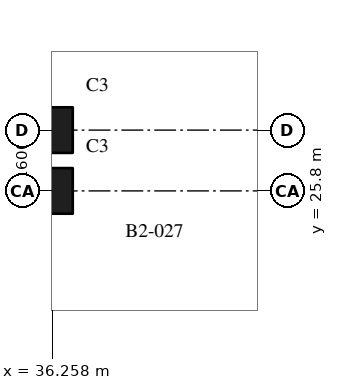
"""IFC4 building model, lengths in metres.
Left out: names, types, materials, properties, quantities, classifications, styles, units other than length and angle.
Written with IfcOpenShell. Run it as: python <this file> out.ifc"""

import sys

from ifc_helpers import new_model, si_unit, direction, frame, origin, origin_2d, place, context, subcontext, project, spatial, rectangle, extrude, element, save


model = new_model("IFC4")
c1 = context("Model", 3, precision=1e-05, world=origin(), true_north=direction((0.0, 1.0)))
c2 = subcontext(c1, "Body", "Model", "MODEL_VIEW")
j1 = project(units=[si_unit("LENGTHUNIT", "METRE"), si_unit("PLANEANGLEUNIT", "RADIAN")], contexts=[c1])
p1 = place(None, origin())
s1 = spatial("IfcSite", under=j1, at=p1, CompositionType="ELEMENT")
p2 = place(p1, origin())
s2 = spatial("IfcBuilding", under=s1, at=p2, CompositionType="ELEMENT")
p3 = place(p2, frame((0.0, 0.0, -12.0)))
s3 = spatial("IfcBuildingStorey", under=s2, at=p3, CompositionType="ELEMENT", Elevation=-12.0)
for number, where, z_axis, x_axis in (
    (1, (36.2, 25.8, 0.0), (0.0, 0.0, 1.0), (1.0, 0.0, 0.0)),
    (2, (36.2, 27.4, 0.0), (0.0, 0.0, 1.0), (1.0, 0.0, 0.0)),
):
    element("IfcColumn", number, at=place(p3, frame(where, z_axis=z_axis, x_axis=x_axis)), inside=s3, PredefinedType="COLUMN", context=c2, shape_type="SweptSolid", body=[
        extrude(rectangle(XDim=1.2, YDim=1.2, at=origin_2d()), origin(), (0.0, 0.0, 1.0), 5.0),
    ])
save(model, sys.argv[1])
